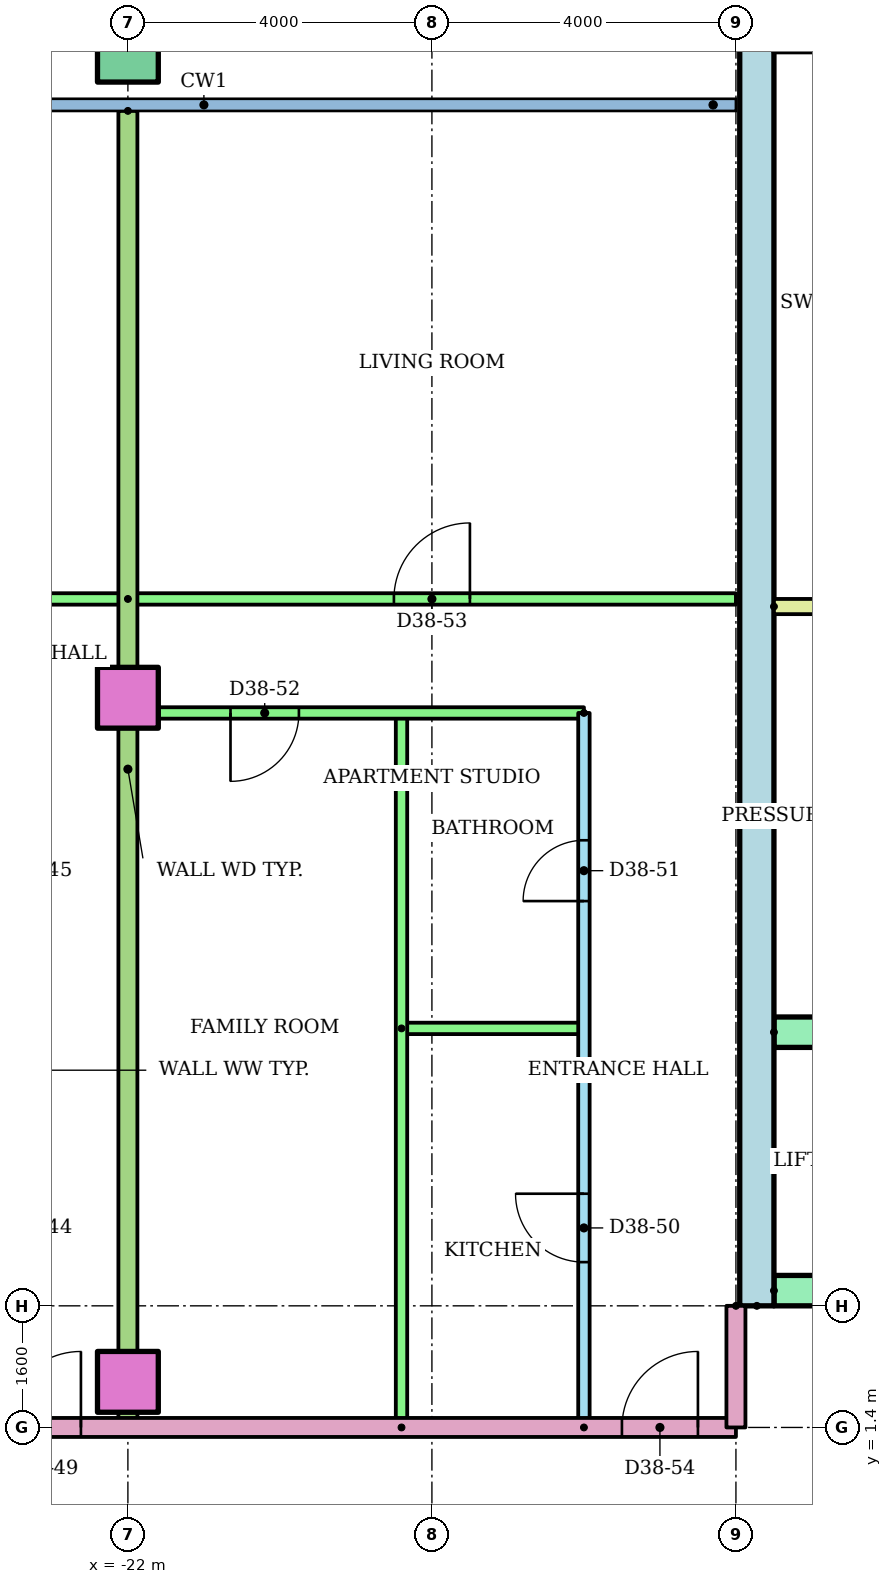
"""IFC4 building model, lengths in metres.
Left out: names, types, materials, properties, quantities, classifications, styles, units other than length and angle.
Written with IfcOpenShell. Run it as: python <this file> out.ifc"""

import sys

from ifc_helpers import new_model, si_unit, direction, frame, frame_2d, origin, origin_2d, place, context, subcontext, project, spatial, rectangle, hollow_rectangle, extrude, element, fill, save


model = new_model("IFC4")
c1 = context("Model", 3, precision=1e-05, world=origin(), true_north=direction((0.0, 1.0)))
c2 = subcontext(c1, "Body", "Model", "MODEL_VIEW")
j1 = project(units=[si_unit("LENGTHUNIT", "METRE"), si_unit("PLANEANGLEUNIT", "RADIAN")], contexts=[c1])
p1 = place(None, origin())
s1 = spatial("IfcSite", under=j1, at=p1, CompositionType="ELEMENT")
p2 = place(p1, origin())
s2 = spatial("IfcBuilding", under=s1, at=p2, CompositionType="ELEMENT")
p3 = place(p2, frame((0.0, 0.0, 145.4)))
s3 = spatial("IfcBuildingStorey", under=s2, at=p3, CompositionType="ELEMENT", Elevation=145.4)
for number, where in (
    (1, (-22.0, 2.0, 0.0)),
    (2, (-22.0, 11.0, 0.0)),
):
    element("IfcColumn", number, at=place(p3, frame(where)), inside=s3, PredefinedType="COLUMN", context=c2, shape_type="SweptSolid", body=[
        extrude(rectangle(XDim=0.8, YDim=0.8, at=origin_2d()), origin(), (0.0, 0.0, 1.0), 3.2),
    ])
p4 = place(p3, frame((-22.0, 19.5, 0.0)))
e3 = element("IfcColumn", 3, at=p4, inside=s3, PredefinedType="COLUMN", context=c2, shape_type="SweptSolid", body=[
    extrude(hollow_rectangle(XDim=0.8, YDim=0.8, WallThickness=0.04, at=origin_2d()), origin(), (0.0, 0.0, 1.0), 3.2),
])
p5 = place(p3, frame((-13.725, 3.0, 0.0), z_axis=(0.0, 0.0, 1.0), x_axis=(0.0, 1.0, 0.0)))
e4 = element("IfcWall", 4, at=p5, inside=s3, PredefinedType="SHEAR", context=c2, shape_type="SweptSolid", body=[
    extrude(rectangle(XDim=17.0, YDim=0.45, at=frame_2d((8.5, 0.0))), origin(), (0.0, 0.0, 1.0), 2.92),
])
p6 = place(p3, frame((-13.5, 3.2, 0.0)))
e5 = element("IfcWall", 5, at=p6, inside=s3, PredefinedType="SHEAR", context=c2, shape_type="SweptSolid", body=[
    extrude(rectangle(XDim=27.0, YDim=0.4, at=frame_2d((13.5, 0.0))), origin(), (0.0, 0.0, 1.0), 2.92),
])
p7 = place(p6, frame((6.861, 0.0, 0.0)))
e6 = element("IfcOpeningElement", 6, at=p7, cuts=e5, PredefinedType="OPENING", context=c2, shape_type="SweptSolid", body=[
    extrude(rectangle(XDim=1.1, YDim=2.1, at=frame_2d((0.55, 1.05))), frame((0.0, 0.21, 0.0), z_axis=(0.0, -1.0, 0.0), x_axis=(1.0, 0.0, 0.0)), (0.0, 0.0, 1.0), 0.42),
])
p8 = place(p6, frame((9.906, 0.0, 0.0)))
e7 = element("IfcOpeningElement", 7, at=p8, cuts=e5, PredefinedType="OPENING", context=c2, shape_type="SweptSolid", body=[
    extrude(rectangle(XDim=1.1, YDim=2.1, at=frame_2d((0.55, 1.05))), frame((0.0, 0.21, 0.0), z_axis=(0.0, -1.0, 0.0), x_axis=(1.0, 0.0, 0.0)), (0.0, 0.0, 1.0), 0.42),
])
p9 = place(p6, frame((15.994, 0.0, 0.0)))
e8 = element("IfcOpeningElement", 8, at=p9, cuts=e5, PredefinedType="OPENING", context=c2, shape_type="SweptSolid", body=[
    extrude(rectangle(XDim=1.1, YDim=2.1, at=frame_2d((0.55, 1.05))), frame((0.0, 0.21, 0.0), z_axis=(0.0, -1.0, 0.0), x_axis=(1.0, 0.0, 0.0)), (0.0, 0.0, 1.0), 0.42),
])
p10 = place(p6, frame((19.039, 0.0, 0.0)))
e9 = element("IfcOpeningElement", 9, at=p10, cuts=e5, PredefinedType="OPENING", context=c2, shape_type="SweptSolid", body=[
    extrude(rectangle(XDim=1.1, YDim=2.1, at=frame_2d((0.55, 1.05))), frame((0.0, 0.21, 0.0), z_axis=(0.0, -1.0, 0.0), x_axis=(1.0, 0.0, 0.0)), (0.0, 0.0, 1.0), 0.42),
])
p11 = place(p6, frame((12.6, 0.0, 0.0)))
e10 = element("IfcOpeningElement", 10, at=p11, cuts=e5, PredefinedType="OPENING", context=c2, shape_type="SweptSolid", body=[
    extrude(rectangle(XDim=1.8, YDim=2.1, at=frame_2d((0.9, 1.05))), frame((0.0, 0.21, 0.0), z_axis=(0.0, -1.0, 0.0), x_axis=(1.0, 0.0, 0.0)), (0.0, 0.0, 1.0), 0.42),
])
p12 = place(p3, frame((-13.5, 6.6, 0.0)))
e11 = element("IfcWall", 11, at=p12, inside=s3, PredefinedType="SHEAR", context=c2, shape_type="SweptSolid", body=[
    extrude(rectangle(XDim=11.978, YDim=0.4, at=frame_2d((5.989, 0.0))), origin(), (0.0, 0.0, 1.0), 2.92),
])
p13 = place(p3, frame((-13.5, 12.2, 0.0)))
e12 = element("IfcWall", 12, at=p13, inside=s3, PredefinedType="PARTITIONING", context=c2, shape_type="SweptSolid", body=[
    extrude(rectangle(XDim=3.9, YDim=0.2, at=frame_2d((1.95, 0.0))), origin(), (0.0, 0.0, 1.0), 2.92),
])
p14 = place(p3, frame((-32.72, 12.3, 0.0)))
e13 = element("IfcWall", 13, at=p14, inside=s3, PredefinedType="PARTITIONING", context=c2, shape_type="SweptSolid", body=[
    extrude(rectangle(XDim=10.72, YDim=0.15, at=frame_2d((5.36, 0.0))), origin(), (0.0, 0.0, 1.0), 2.4),
])
p15 = place(p14, frame((1.102, 0.0, 0.0)))
e14 = element("IfcOpeningElement", 14, at=p15, cuts=e13, PredefinedType="OPENING", context=c2, shape_type="SweptSolid", body=[
    extrude(rectangle(XDim=1.0, YDim=2.1, at=frame_2d((0.5, 1.05))), frame((0.0, 0.085, 0.0), z_axis=(0.0, -1.0, 0.0), x_axis=(1.0, 0.0, 0.0)), (0.0, 0.0, 1.0), 0.17),
])
p16 = place(p14, frame((7.22, 0.0, 0.0)))
e15 = element("IfcOpeningElement", 15, at=p16, cuts=e13, PredefinedType="OPENING", context=c2, shape_type="SweptSolid", body=[
    extrude(rectangle(XDim=1.0, YDim=2.1, at=frame_2d((0.5, 1.05))), frame((0.0, 0.085, 0.0), z_axis=(0.0, -1.0, 0.0), x_axis=(1.0, 0.0, 0.0)), (0.0, 0.0, 1.0), 0.17),
])
p17 = place(p3, frame((-16.0, 1.4, 0.0), z_axis=(0.0, 0.0, 1.0), x_axis=(0.0, 1.0, 0.0)))
e16 = element("IfcWall", 16, at=p17, inside=s3, PredefinedType="PARTITIONING", context=c2, shape_type="SweptSolid", body=[
    extrude(rectangle(XDim=9.4, YDim=0.15, at=frame_2d((4.7, 0.0))), origin(), (0.0, 0.0, 1.0), 2.4),
])
p18 = place(p17, frame((2.175, 0.0, 0.0)))
e17 = element("IfcOpeningElement", 17, at=p18, cuts=e16, PredefinedType="OPENING", context=c2, shape_type="SweptSolid", body=[
    extrude(rectangle(XDim=0.9, YDim=2.1, at=frame_2d((0.45, 1.05))), frame((0.0, 0.085, 0.0), z_axis=(0.0, -1.0, 0.0), x_axis=(1.0, 0.0, 0.0)), (0.0, 0.0, 1.0), 0.17),
])
p19 = place(p17, frame((6.925, 0.0, 0.0)))
e18 = element("IfcOpeningElement", 18, at=p19, cuts=e16, PredefinedType="OPENING", context=c2, shape_type="SweptSolid", body=[
    extrude(rectangle(XDim=0.8, YDim=2.1, at=frame_2d((0.4, 1.05))), frame((0.0, 0.085, 0.0), z_axis=(0.0, -1.0, 0.0), x_axis=(1.0, 0.0, 0.0)), (0.0, 0.0, 1.0), 0.17),
])
p20 = place(p3, frame((-18.4, 6.65, 0.0)))
e19 = element("IfcWall", 19, at=p20, inside=s3, PredefinedType="PARTITIONING", context=c2, shape_type="SweptSolid", body=[
    extrude(rectangle(XDim=2.4, YDim=0.15, at=frame_2d((1.2, 0.0))), origin(), (0.0, 0.0, 1.0), 2.4),
])
p21 = place(p3, frame((-18.4, 1.4, 0.0), z_axis=(0.0, 0.0, 1.0), x_axis=(0.0, 1.0, 0.0)))
e20 = element("IfcWall", 20, at=p21, inside=s3, PredefinedType="PARTITIONING", context=c2, shape_type="SweptSolid", body=[
    extrude(rectangle(XDim=9.4, YDim=0.15, at=frame_2d((4.7, 0.0))), origin(), (0.0, 0.0, 1.0), 2.4),
])
p22 = place(p3, frame((-16.0, 10.8, 0.0), z_axis=(0.0, 0.0, 1.0), x_axis=(-1.0, 0.0, 0.0)))
e21 = element("IfcWall", 21, at=p22, inside=s3, PredefinedType="PARTITIONING", context=c2, shape_type="SweptSolid", body=[
    extrude(rectangle(XDim=6.0, YDim=0.15, at=frame_2d((3.0, 0.0))), origin(), (0.0, 0.0, 1.0), 2.4),
])
p23 = place(p22, frame((3.75, 0.0, 0.0)))
e22 = element("IfcOpeningElement", 22, at=p23, cuts=e21, PredefinedType="OPENING", context=c2, shape_type="SweptSolid", body=[
    extrude(rectangle(XDim=0.9, YDim=2.1, at=frame_2d((0.45, 1.05))), frame((0.0, 0.085, 0.0), z_axis=(0.0, -1.0, 0.0), x_axis=(1.0, 0.0, 0.0)), (0.0, 0.0, 1.0), 0.17),
])
p24 = place(p3, frame((-22.0, 12.3, 0.0)))
e23 = element("IfcWall", 23, at=p24, inside=s3, PredefinedType="PARTITIONING", context=c2, shape_type="SweptSolid", body=[
    extrude(rectangle(XDim=8.0, YDim=0.15, at=frame_2d((4.0, 0.0))), origin(), (0.0, 0.0, 1.0), 2.4),
])
p25 = place(p24, frame((3.5, 0.0, 0.0)))
e24 = element("IfcOpeningElement", 24, at=p25, cuts=e23, PredefinedType="OPENING", context=c2, shape_type="SweptSolid", body=[
    extrude(rectangle(XDim=1.0, YDim=2.1, at=frame_2d((0.5, 1.05))), frame((0.0, 0.085, 0.0), z_axis=(0.0, -1.0, 0.0), x_axis=(1.0, 0.0, 0.0)), (0.0, 0.0, 1.0), 0.17),
])
p26 = place(p3, frame((-22.0, 18.721, 0.0), z_axis=(0.0, 0.0, 1.0), x_axis=(0.0, -1.0, 0.0)))
e25 = element("IfcWall", 25, at=p26, inside=s3, PredefinedType="PARTITIONING", context=c2, shape_type="SweptSolid", body=[
    extrude(rectangle(XDim=17.321, YDim=0.25, at=frame_2d((8.661, 0.0))), origin(), (0.0, 0.0, 1.0), 2.4),
])
p27 = place(p3, frame((-29.0, 1.4, 0.0)))
e26 = element("IfcWall", 26, at=p27, inside=s3, PredefinedType="PARTITIONING", context=c2, shape_type="SweptSolid", body=[
    extrude(rectangle(XDim=15.0, YDim=0.25, at=frame_2d((7.5, 0.0))), origin(), (0.0, 0.0, 1.0), 2.4),
])
p28 = place(p27, frame((5.382, 0.0, 0.0)))
e27 = element("IfcOpeningElement", 27, at=p28, cuts=e26, PredefinedType="OPENING", context=c2, shape_type="SweptSolid", body=[
    extrude(rectangle(XDim=1.0, YDim=2.1, at=frame_2d((0.5, 1.05))), frame((0.0, 0.135, 0.0), z_axis=(0.0, -1.0, 0.0), x_axis=(1.0, 0.0, 0.0)), (0.0, 0.0, 1.0), 0.27),
])
p29 = place(p27, frame((13.5, 0.0, 0.0)))
e28 = element("IfcOpeningElement", 28, at=p29, cuts=e26, PredefinedType="OPENING", context=c2, shape_type="SweptSolid", body=[
    extrude(rectangle(XDim=1.0, YDim=2.1, at=frame_2d((0.5, 1.05))), frame((0.0, 0.135, 0.0), z_axis=(0.0, -1.0, 0.0), x_axis=(1.0, 0.0, 0.0)), (0.0, 0.0, 1.0), 0.27),
])
p30 = place(p3, frame((-14.0, 3.0, 0.0), z_axis=(0.0, 0.0, 1.0), x_axis=(0.0, -1.0, 0.0)))
e29 = element("IfcWall", 29, at=p30, inside=s3, PredefinedType="PARTITIONING", context=c2, shape_type="SweptSolid", body=[
    extrude(rectangle(XDim=1.6, YDim=0.25, at=frame_2d((0.8, 0.0))), origin(), (0.0, 0.0, 1.0), 2.4),
])
p31 = place(p28, origin())
e30 = element("IfcDoor", 30, at=p31, inside=s3, OperationType="SINGLE_SWING_RIGHT", PredefinedType="DOOR", context=c2, shape_type="SweptSolid", body=[
    extrude(rectangle(XDim=1.0, YDim=2.1, at=frame_2d((0.5, 1.05))), frame((0.0, 0.025, 0.0), z_axis=(0.0, -1.0, 0.0), x_axis=(1.0, 0.0, 0.0)), (0.0, 0.0, 1.0), 0.05),
])
fill(e27, e30)
p32 = place(p18, origin())
e31 = element("IfcDoor", 31, at=p32, inside=s3, OperationType="SINGLE_SWING_RIGHT", PredefinedType="DOOR", context=c2, shape_type="SweptSolid", body=[
    extrude(rectangle(XDim=0.9, YDim=2.1, at=frame_2d((0.45, 1.05))), frame((0.0, 0.025, 0.0), z_axis=(0.0, -1.0, 0.0), x_axis=(1.0, 0.0, 0.0)), (0.0, 0.0, 1.0), 0.05),
])
fill(e17, e31)
p33 = place(p19, origin())
e32 = element("IfcDoor", 32, at=p33, inside=s3, OperationType="SINGLE_SWING_LEFT", PredefinedType="DOOR", context=c2, shape_type="SweptSolid", body=[
    extrude(rectangle(XDim=0.8, YDim=2.1, at=frame_2d((0.4, 1.05))), frame((0.0, 0.025, 0.0), z_axis=(0.0, -1.0, 0.0), x_axis=(1.0, 0.0, 0.0)), (0.0, 0.0, 1.0), 0.05),
])
fill(e18, e32)
p34 = place(p23, origin())
e33 = element("IfcDoor", 33, at=p34, inside=s3, OperationType="SINGLE_SWING_RIGHT", PredefinedType="DOOR", context=c2, shape_type="SweptSolid", body=[
    extrude(rectangle(XDim=0.9, YDim=2.1, at=frame_2d((0.45, 1.05))), frame((0.0, 0.025, 0.0), z_axis=(0.0, -1.0, 0.0), x_axis=(1.0, 0.0, 0.0)), (0.0, 0.0, 1.0), 0.05),
])
fill(e22, e33)
p35 = place(p25, origin())
e34 = element("IfcDoor", 34, at=p35, inside=s3, OperationType="SINGLE_SWING_RIGHT", PredefinedType="DOOR", context=c2, shape_type="SweptSolid", body=[
    extrude(rectangle(XDim=1.0, YDim=2.1, at=frame_2d((0.5, 1.05))), frame((0.0, 0.025, 0.0), z_axis=(0.0, -1.0, 0.0), x_axis=(1.0, 0.0, 0.0)), (0.0, 0.0, 1.0), 0.05),
])
fill(e24, e34)
p36 = place(p29, origin())
e35 = element("IfcDoor", 35, at=p36, inside=s3, OperationType="SINGLE_SWING_RIGHT", PredefinedType="DOOR", context=c2, shape_type="SweptSolid", body=[
    extrude(rectangle(XDim=1.0, YDim=2.1, at=frame_2d((0.5, 1.05))), frame((0.0, 0.025, 0.0), z_axis=(0.0, -1.0, 0.0), x_axis=(1.0, 0.0, 0.0)), (0.0, 0.0, 1.0), 0.05),
])
fill(e28, e35)
save(model, sys.argv[1])
